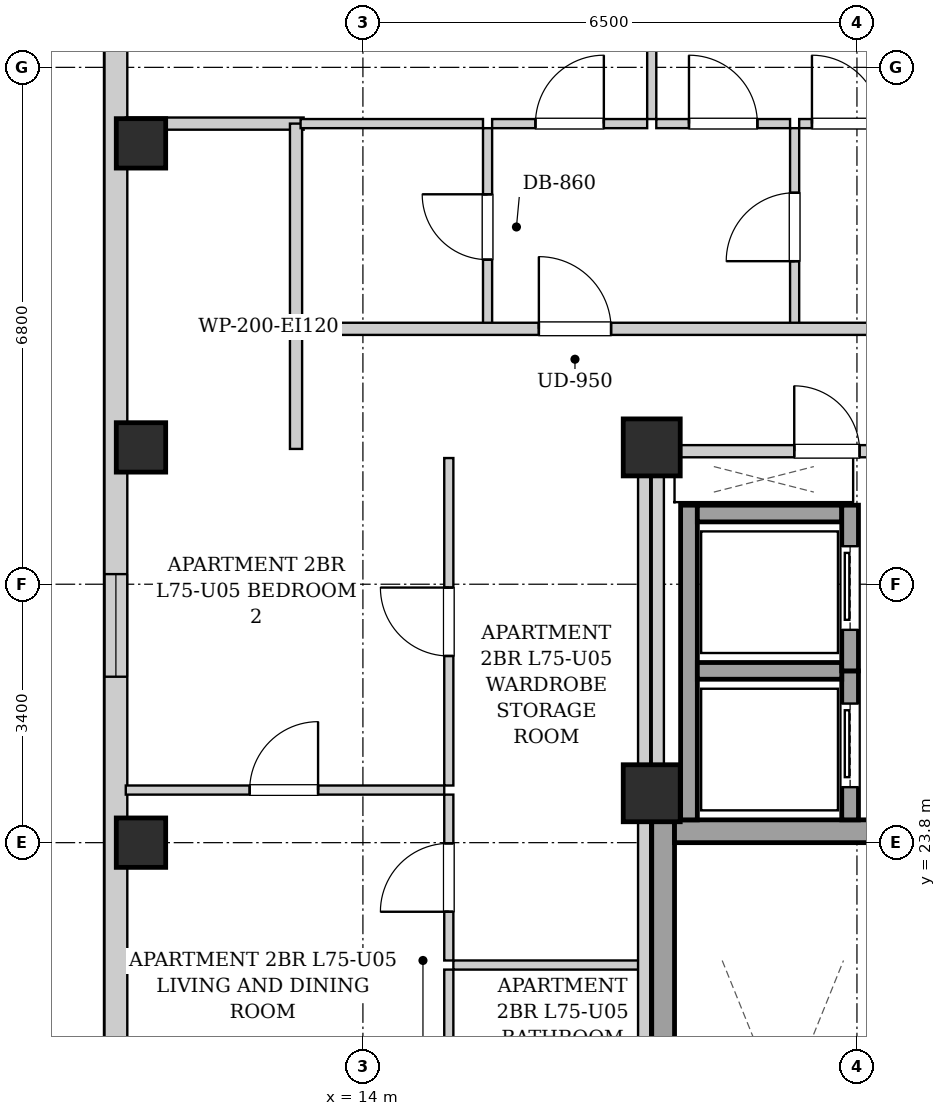
"""IFC4 building model, lengths in metres.
Left out: names, types, materials, properties, quantities, classifications, styles, units other than length and angle.
Written with IfcOpenShell. Run it as: python <this file> out.ifc"""

import sys

from ifc_helpers import new_model, si_unit, direction, frame, frame_2d, origin, origin_2d, place, context, subcontext, project, spatial, rectangle, extrude, element, fill, save


model = new_model("IFC4")
c1 = context("Model", 3, precision=1e-05, world=origin(), true_north=direction((0.0, 1.0)))
c2 = subcontext(c1, "Body", "Model", "MODEL_VIEW")
j1 = project(units=[si_unit("LENGTHUNIT", "METRE"), si_unit("PLANEANGLEUNIT", "RADIAN")], contexts=[c1])
p1 = place(None, origin())
s1 = spatial("IfcSite", under=j1, at=p1, CompositionType="ELEMENT")
p2 = place(p1, origin())
s2 = spatial("IfcBuilding", under=s1, at=p2, CompositionType="ELEMENT")
p3 = place(p2, frame((0.0, 0.0, 258.1)))
s3 = spatial("IfcBuildingStorey", under=s2, at=p3, CompositionType="ELEMENT", Elevation=258.1)
for number, where, z_axis, x_axis in (
    (1, (11.08, 23.8, 0.0), (0.0, 0.0, 1.0), (1.0, 0.0, 0.0)),
    (2, (11.08, 29.0, 0.0), (0.0, 0.0, 1.0), (1.0, 0.0, 0.0)),
    (3, (11.08, 33.0, 0.0), (0.0, 0.0, 1.0), (1.0, 0.0, 0.0)),
):
    element("IfcColumn", number, at=place(p3, frame(where, z_axis=z_axis, x_axis=x_axis)), inside=s3, PredefinedType="COLUMN", context=c2, shape_type="SweptSolid", body=[
        extrude(rectangle(XDim=0.65, YDim=0.65, at=origin_2d()), origin(), (0.0, 0.0, 1.0), 3.4),
    ])
for number, where, z_axis, x_axis in (
    (4, (17.8, 29.0, 0.0), (0.0, 0.0, 1.0), (1.0, 0.0, 0.0)),
    (5, (17.8, 24.45, 0.0), (0.0, 0.0, 1.0), (1.0, 0.0, 0.0)),
):
    element("IfcColumn", number, at=place(p3, frame(where, z_axis=z_axis, x_axis=x_axis)), inside=s3, PredefinedType="COLUMN", context=c2, shape_type="SweptSolid", body=[
        extrude(rectangle(XDim=0.75, YDim=0.75, at=origin_2d()), origin(), (0.0, 0.0, 1.0), 3.4),
    ])
p4 = place(p3, frame((10.75, 6.3, 0.0), z_axis=(0.0, 0.0, 1.0), x_axis=(0.0, 1.0, 0.0)))
e6 = element("IfcWall", 6, at=p4, inside=s3, PredefinedType="SOLIDWALL", context=c2, shape_type="SweptSolid", body=[
    extrude(rectangle(XDim=31.4, YDim=0.3, at=frame_2d((15.7, 0.0))), origin(), (0.0, 0.0, 1.0), 3.05),
])
p5 = place(p4, frame((1.653, 0.0, 0.55)))
e7 = element("IfcOpeningElement", 7, at=p5, cuts=e6, PredefinedType="OPENING", context=c2, shape_type="SweptSolid", body=[
    extrude(rectangle(XDim=1.35, YDim=1.2, at=frame_2d((0.675, 0.6))), frame((0.0, 0.16, 0.0), z_axis=(0.0, -1.0, 0.0), x_axis=(1.0, 0.0, 0.0)), (0.0, 0.0, 1.0), 0.32),
])
p6 = place(p4, frame((10.367, 0.0, 0.55)))
e8 = element("IfcOpeningElement", 8, at=p6, cuts=e6, PredefinedType="OPENING", context=c2, shape_type="SweptSolid", body=[
    extrude(rectangle(XDim=1.35, YDim=1.2, at=frame_2d((0.675, 0.6))), frame((0.0, 0.16, 0.0), z_axis=(0.0, -1.0, 0.0), x_axis=(1.0, 0.0, 0.0)), (0.0, 0.0, 1.0), 0.32),
])
p7 = place(p4, frame((19.683, 0.0, 0.55)))
e9 = element("IfcOpeningElement", 9, at=p7, cuts=e6, PredefinedType="OPENING", context=c2, shape_type="SweptSolid", body=[
    extrude(rectangle(XDim=1.35, YDim=1.2, at=frame_2d((0.675, 0.6))), frame((0.0, 0.16, 0.0), z_axis=(0.0, -1.0, 0.0), x_axis=(1.0, 0.0, 0.0)), (0.0, 0.0, 1.0), 0.32),
])
p8 = place(p3, frame((17.95, 15.1, 0.0), z_axis=(0.0, 0.0, 1.0), x_axis=(0.0, 1.0, 0.0)))
e10 = element("IfcWall", 10, at=p8, inside=s3, PredefinedType="SHEAR", context=c2, shape_type="SweptSolid", body=[
    extrude(rectangle(XDim=9.0, YDim=0.3, at=frame_2d((4.5, 0.0))), origin(), (0.0, 0.0, 1.0), 3.05),
])
p9 = place(p3, frame((18.1, 23.95, 0.0), z_axis=(0.0, 0.0, 1.0), x_axis=(1.0, 0.0, 0.0)))
e11 = element("IfcWall", 11, at=p9, inside=s3, PredefinedType="SHEAR", context=c2, shape_type="SweptSolid", body=[
    extrude(rectangle(XDim=2.85, YDim=0.3, at=frame_2d((1.425, 0.0))), origin(), (0.0, 0.0, 1.0), 3.05),
])
p10 = place(p3, frame((18.29, 24.1, 0.0), z_axis=(0.0, 0.0, 1.0), x_axis=(0.0, 1.0, 0.0)))
e12 = element("IfcWall", 12, at=p10, inside=s3, PredefinedType="SHEAR", context=c2, shape_type="SweptSolid", body=[
    extrude(rectangle(XDim=4.14, YDim=0.22, at=frame_2d((2.07, 0.0))), origin(), (0.0, 0.0, 1.0), 3.05),
])
p11 = place(p3, frame((20.41, 24.1, 0.0), z_axis=(0.0, 0.0, 1.0), x_axis=(0.0, 1.0, 0.0)))
e13 = element("IfcWall", 13, at=p11, inside=s3, PredefinedType="SHEAR", context=c2, shape_type="SweptSolid", body=[
    extrude(rectangle(XDim=1.96, YDim=0.22, at=frame_2d((0.98, 0.0))), origin(), (0.0, 0.0, 1.0), 3.05),
])
p12 = place(p11, frame((0.43, 0.0, 0.0)))
e14 = element("IfcOpeningElement", 14, at=p12, cuts=e13, PredefinedType="OPENING", context=c2, shape_type="SweptSolid", body=[
    extrude(rectangle(XDim=1.1, YDim=2.15, at=frame_2d((0.55, 1.075))), frame((0.0, 0.12, 0.0), z_axis=(0.0, -1.0, 0.0), x_axis=(1.0, 0.0, 0.0)), (0.0, 0.0, 1.0), 0.24),
])
for number, where, z_axis, x_axis in (
    (15, (18.4, 26.06, 0.0), (0.0, 0.0, 1.0), (1.0, 0.0, 0.0)),
    (16, (18.4, 28.13, 0.0), (0.0, 0.0, 1.0), (1.0, 0.0, 0.0)),
):
    element("IfcWall", number, at=place(p3, frame(where, z_axis=z_axis, x_axis=x_axis)), inside=s3, PredefinedType="SHEAR", context=c2, shape_type="SweptSolid", body=[
        extrude(rectangle(XDim=1.9, YDim=0.22, at=frame_2d((0.95, 0.0))), origin(), (0.0, 0.0, 1.0), 3.05),
    ])
p13 = place(p3, frame((20.41, 26.06, 0.0), z_axis=(0.0, 0.0, 1.0), x_axis=(0.0, 1.0, 0.0)))
e17 = element("IfcWall", 17, at=p13, inside=s3, PredefinedType="SHEAR", context=c2, shape_type="SweptSolid", body=[
    extrude(rectangle(XDim=2.18, YDim=0.22, at=frame_2d((1.09, 0.0))), origin(), (0.0, 0.0, 1.0), 3.05),
])
p14 = place(p13, frame((0.54, 0.0, 0.0)))
e18 = element("IfcOpeningElement", 18, at=p14, cuts=e17, PredefinedType="OPENING", context=c2, shape_type="SweptSolid", body=[
    extrude(rectangle(XDim=1.1, YDim=2.15, at=frame_2d((0.55, 1.075))), frame((0.0, 0.12, 0.0), z_axis=(0.0, -1.0, 0.0), x_axis=(1.0, 0.0, 0.0)), (0.0, 0.0, 1.0), 0.24),
])
p15 = place(p3, frame((17.88, 24.12, 0.0), z_axis=(0.0, 0.0, 1.0), x_axis=(0.0, 1.0, 0.0)))
e19 = element("IfcWall", 19, at=p15, inside=s3, PredefinedType="PARTITIONING", context=c2, shape_type="SweptSolid", body=[
    extrude(rectangle(XDim=4.76, YDim=0.16, at=frame_2d((2.38, 0.0))), origin(), (0.0, 0.0, 1.0), 2.385),
])
p16 = place(p3, frame((17.96, 28.95, 0.0), z_axis=(0.0, 0.0, 1.0), x_axis=(1.0, 0.0, 0.0)))
e20 = element("IfcWall", 20, at=p16, inside=s3, PredefinedType="PARTITIONING", context=c2, shape_type="SweptSolid", body=[
    extrude(rectangle(XDim=4.29, YDim=0.16, at=frame_2d((2.145, 0.0))), origin(), (0.0, 0.0, 1.0), 2.578),
])
p17 = place(p16, frame((1.715, 0.0, 0.0)))
e21 = element("IfcOpeningElement", 21, at=p17, cuts=e20, PredefinedType="OPENING", context=c2, shape_type="SweptSolid", body=[
    extrude(rectangle(XDim=0.86, YDim=2.05, at=frame_2d((0.43, 1.025))), frame((0.0, 0.09, 0.0), z_axis=(0.0, -1.0, 0.0), x_axis=(1.0, 0.0, 0.0)), (0.0, 0.0, 1.0), 0.18),
])
p18 = place(p3, frame((13.12, 28.98, 0.0), z_axis=(0.0, 0.0, 1.0), x_axis=(0.0, 1.0, 0.0)))
e22 = element("IfcWall", 22, at=p18, inside=s3, PredefinedType="PARTITIONING", context=c2, shape_type="SweptSolid", body=[
    extrude(rectangle(XDim=1.58, YDim=0.16, at=frame_2d((0.79, 0.0))), origin(), (0.0, 0.0, 1.0), 3.05),
])
p19 = place(p3, frame((10.88, 33.26, 0.0), z_axis=(0.0, 0.0, 1.0), x_axis=(1.0, 0.0, 0.0)))
e23 = element("IfcWall", 23, at=p19, inside=s3, PredefinedType="PARTITIONING", context=c2, shape_type="SweptSolid", body=[
    extrude(rectangle(XDim=2.34, YDim=0.16, at=frame_2d((1.17, 0.0))), origin(), (0.0, 0.0, 1.0), 3.05),
])
p20 = place(p3, frame((13.12, 30.6, 0.0), z_axis=(0.0, 0.0, 1.0), x_axis=(0.0, 1.0, 0.0)))
e24 = element("IfcWall", 24, at=p20, inside=s3, PredefinedType="PARTITIONING", context=c2, shape_type="SweptSolid", body=[
    extrude(rectangle(XDim=2.66, YDim=0.16, at=frame_2d((1.33, 0.0))), origin(), (0.0, 0.0, 1.0), 3.05),
])
p21 = place(p3, frame((15.64, 30.6, 0.0), z_axis=(0.0, 0.0, 1.0), x_axis=(0.0, 1.0, 0.0)))
e25 = element("IfcWall", 25, at=p21, inside=s3, PredefinedType="PARTITIONING", context=c2, shape_type="SweptSolid", body=[
    extrude(rectangle(XDim=2.6, YDim=0.12, at=frame_2d((1.3, 0.0))), origin(), (0.0, 0.0, 1.0), 3.05),
])
p22 = place(p21, frame((0.87, 0.0, 0.0)))
e26 = element("IfcOpeningElement", 26, at=p22, cuts=e25, PredefinedType="OPENING", context=c2, shape_type="SweptSolid", body=[
    extrude(rectangle(XDim=0.86, YDim=2.05, at=frame_2d((0.43, 1.025))), frame((0.0, 0.07, 0.0), z_axis=(0.0, -1.0, 0.0), x_axis=(1.0, 0.0, 0.0)), (0.0, 0.0, 1.0), 0.14),
])
p23 = place(p3, frame((13.18, 33.26, 0.0), z_axis=(0.0, 0.0, 1.0), x_axis=(1.0, 0.0, 0.0)))
e27 = element("IfcWall", 27, at=p23, inside=s3, PredefinedType="PARTITIONING", context=c2, shape_type="SweptSolid", body=[
    extrude(rectangle(XDim=2.4, YDim=0.12, at=frame_2d((1.2, 0.0))), origin(), (0.0, 0.0, 1.0), 3.05),
])
p24 = place(p3, frame((19.68, 30.6, 0.0), z_axis=(0.0, 0.0, 1.0), x_axis=(0.0, 1.0, 0.0)))
e28 = element("IfcWall", 28, at=p24, inside=s3, PredefinedType="PARTITIONING", context=c2, shape_type="SweptSolid", body=[
    extrude(rectangle(XDim=2.6, YDim=0.12, at=frame_2d((1.3, 0.0))), origin(), (0.0, 0.0, 1.0), 3.05),
])
p25 = place(p24, frame((0.85, 0.0, 0.0)))
e29 = element("IfcOpeningElement", 29, at=p25, cuts=e28, PredefinedType="OPENING", context=c2, shape_type="SweptSolid", body=[
    extrude(rectangle(XDim=0.9, YDim=2.05, at=frame_2d((0.45, 1.025))), frame((0.0, 0.07, 0.0), z_axis=(0.0, -1.0, 0.0), x_axis=(1.0, 0.0, 0.0)), (0.0, 0.0, 1.0), 0.14),
])
p26 = place(p3, frame((15.7, 33.26, 0.0), z_axis=(0.0, 0.0, 1.0), x_axis=(1.0, 0.0, 0.0)))
e30 = element("IfcWall", 30, at=p26, inside=s3, PredefinedType="PARTITIONING", context=c2, shape_type="SweptSolid", body=[
    extrude(rectangle(XDim=2.04, YDim=0.12, at=frame_2d((1.02, 0.0))), origin(), (0.0, 0.0, 1.0), 3.05),
])
p27 = place(p26, frame((0.57, 0.0, 0.0)))
e31 = element("IfcOpeningElement", 31, at=p27, cuts=e30, PredefinedType="OPENING", context=c2, shape_type="SweptSolid", body=[
    extrude(rectangle(XDim=0.9, YDim=2.05, at=frame_2d((0.45, 1.025))), frame((0.0, 0.07, 0.0), z_axis=(0.0, -1.0, 0.0), x_axis=(1.0, 0.0, 0.0)), (0.0, 0.0, 1.0), 0.14),
])
p28 = place(p3, frame((17.86, 33.26, 0.0), z_axis=(0.0, 0.0, 1.0), x_axis=(1.0, 0.0, 0.0)))
e32 = element("IfcWall", 32, at=p28, inside=s3, PredefinedType="PARTITIONING", context=c2, shape_type="SweptSolid", body=[
    extrude(rectangle(XDim=1.76, YDim=0.12, at=frame_2d((0.88, 0.0))), origin(), (0.0, 0.0, 1.0), 3.05),
])
p29 = place(p28, frame((0.43, 0.0, 0.0)))
e33 = element("IfcOpeningElement", 33, at=p29, cuts=e32, PredefinedType="OPENING", context=c2, shape_type="SweptSolid", body=[
    extrude(rectangle(XDim=0.9, YDim=2.05, at=frame_2d((0.45, 1.025))), frame((0.0, 0.07, 0.0), z_axis=(0.0, -1.0, 0.0), x_axis=(1.0, 0.0, 0.0)), (0.0, 0.0, 1.0), 0.14),
])
p30 = place(p3, frame((19.74, 33.26, 0.0), z_axis=(0.0, 0.0, 1.0), x_axis=(1.0, 0.0, 0.0)))
e34 = element("IfcWall", 34, at=p30, inside=s3, PredefinedType="PARTITIONING", context=c2, shape_type="SweptSolid", body=[
    extrude(rectangle(XDim=1.237, YDim=0.12, at=frame_2d((0.619, 0.0))), origin(), (0.0, 0.0, 1.0), 3.05),
])
p31 = place(p30, frame((0.168, 0.0, 0.0)))
e35 = element("IfcOpeningElement", 35, at=p31, cuts=e34, PredefinedType="OPENING", context=c2, shape_type="SweptSolid", body=[
    extrude(rectangle(XDim=0.9, YDim=2.05, at=frame_2d((0.45, 1.025))), frame((0.0, 0.07, 0.0), z_axis=(0.0, -1.0, 0.0), x_axis=(1.0, 0.0, 0.0)), (0.0, 0.0, 1.0), 0.14),
])
p32 = place(p3, frame((17.8, 33.32, 0.0), z_axis=(0.0, 0.0, 1.0), x_axis=(0.0, 1.0, 0.0)))
e36 = element("IfcWall", 36, at=p32, inside=s3, PredefinedType="PARTITIONING", context=c2, shape_type="SweptSolid", body=[
    extrude(rectangle(XDim=6.6, YDim=0.12, at=frame_2d((3.3, 0.0))), origin(), (0.0, 0.0, 1.0), 2.578),
])
p33 = place(p32, frame((2.835, 0.0, 0.0)))
e37 = element("IfcOpeningElement", 37, at=p33, cuts=e36, PredefinedType="OPENING", context=c2, shape_type="SweptSolid", body=[
    extrude(rectangle(XDim=0.9, YDim=2.05, at=frame_2d((0.45, 1.025))), frame((0.0, 0.07, 0.0), z_axis=(0.0, -1.0, 0.0), x_axis=(1.0, 0.0, 0.0)), (0.0, 0.0, 1.0), 0.14),
])
p34 = place(p3, frame((15.19, 22.19, 0.0), z_axis=(0.0, 0.0, 1.0), x_axis=(1.0, 0.0, 0.0)))
e38 = element("IfcWall", 38, at=p34, inside=s3, PredefinedType="PARTITIONING", context=c2, shape_type="SweptSolid", body=[
    extrude(rectangle(XDim=2.45, YDim=0.12, at=frame_2d((1.225, 0.0))), origin(), (0.0, 0.0, 1.0), 3.05),
])
p35 = place(p3, frame((15.13, 22.25, 0.0), z_axis=(0.0, 0.0, 1.0), x_axis=(0.0, 1.0, 0.0)))
e39 = element("IfcWall", 39, at=p35, inside=s3, PredefinedType="PARTITIONING", context=c2, shape_type="SweptSolid", body=[
    extrude(rectangle(XDim=2.182, YDim=0.12, at=frame_2d((1.091, 0.0))), origin(), (0.0, 0.0, 1.0), 3.05),
])
p36 = place(p35, frame((0.641, 0.0, 0.0)))
e40 = element("IfcOpeningElement", 40, at=p36, cuts=e39, PredefinedType="OPENING", context=c2, shape_type="SweptSolid", body=[
    extrude(rectangle(XDim=0.9, YDim=2.05, at=frame_2d((0.45, 1.025))), frame((0.0, 0.07, 0.0), z_axis=(0.0, -1.0, 0.0), x_axis=(1.0, 0.0, 0.0)), (0.0, 0.0, 1.0), 0.14),
])
p37 = place(p3, frame((15.13, 24.552, 0.0), z_axis=(0.0, 0.0, 1.0), x_axis=(0.0, 1.0, 0.0)))
e41 = element("IfcWall", 41, at=p37, inside=s3, PredefinedType="PARTITIONING", context=c2, shape_type="SweptSolid", body=[
    extrude(rectangle(XDim=4.308, YDim=0.12, at=frame_2d((2.154, 0.0))), origin(), (0.0, 0.0, 1.0), 3.05),
])
p38 = place(p37, frame((1.704, 0.0, 0.0)))
e42 = element("IfcOpeningElement", 42, at=p38, cuts=e41, PredefinedType="OPENING", context=c2, shape_type="SweptSolid", body=[
    extrude(rectangle(XDim=0.9, YDim=2.05, at=frame_2d((0.45, 1.025))), frame((0.0, 0.07, 0.0), z_axis=(0.0, -1.0, 0.0), x_axis=(1.0, 0.0, 0.0)), (0.0, 0.0, 1.0), 0.14),
])
p39 = place(p3, frame((15.13, 19.83, 0.0), z_axis=(0.0, 0.0, 1.0), x_axis=(0.0, 1.0, 0.0)))
e43 = element("IfcWall", 43, at=p39, inside=s3, PredefinedType="PARTITIONING", context=c2, shape_type="SweptSolid", body=[
    extrude(rectangle(XDim=2.3, YDim=0.12, at=frame_2d((1.15, 0.0))), origin(), (0.0, 0.0, 1.0), 3.05),
])
p40 = place(p3, frame((10.88, 24.492, 0.0), z_axis=(0.0, 0.0, 1.0), x_axis=(1.0, 0.0, 0.0)))
e44 = element("IfcWall", 44, at=p40, inside=s3, PredefinedType="PARTITIONING", context=c2, shape_type="SweptSolid", body=[
    extrude(rectangle(XDim=4.19, YDim=0.12, at=frame_2d((2.095, 0.0))), origin(), (0.0, 0.0, 1.0), 2.788),
])
p41 = place(p40, frame((1.63, 0.0, 0.0)))
e45 = element("IfcOpeningElement", 45, at=p41, cuts=e44, PredefinedType="OPENING", context=c2, shape_type="SweptSolid", body=[
    extrude(rectangle(XDim=0.9, YDim=2.05, at=frame_2d((0.45, 1.025))), frame((0.0, 0.07, 0.0), z_axis=(0.0, -1.0, 0.0), x_axis=(1.0, 0.0, 0.0)), (0.0, 0.0, 1.0), 0.14),
])
p42 = place(p3, frame((13.15, 30.56, 0.0), z_axis=(0.0, 0.0, 1.0), x_axis=(1.0, 0.0, 0.0)))
e46 = element("IfcWall", 46, at=p42, inside=s3, PredefinedType="PARTITIONING", context=c2, shape_type="SweptSolid", body=[
    extrude(rectangle(XDim=24.6, YDim=0.16, at=frame_2d((12.3, 0.0))), origin(), (0.0, 0.0, 1.0), 3.05),
])
p43 = place(p42, frame((3.165, 0.0, 0.0)))
e47 = element("IfcOpeningElement", 47, at=p43, cuts=e46, PredefinedType="OPENING", context=c2, shape_type="SweptSolid", body=[
    extrude(rectangle(XDim=0.95, YDim=2.1, at=frame_2d((0.475, 1.05))), frame((0.0, 0.09, 0.0), z_axis=(0.0, -1.0, 0.0), x_axis=(1.0, 0.0, 0.0)), (0.0, 0.0, 1.0), 0.18),
])
p44 = place(p42, frame((21.55, 0.0, 0.0)))
e48 = element("IfcOpeningElement", 48, at=p44, cuts=e46, PredefinedType="OPENING", context=c2, shape_type="SweptSolid", body=[
    extrude(rectangle(XDim=0.95, YDim=2.1, at=frame_2d((0.475, 1.05))), frame((0.0, 0.09, 0.0), z_axis=(0.0, -1.0, 0.0), x_axis=(1.0, 0.0, 0.0)), (0.0, 0.0, 1.0), 0.18),
])
p45 = place(p3, frame((17.7, 15.02, 0.0), z_axis=(0.0, 0.0, 1.0), x_axis=(0.0, 1.0, 0.0)))
e49 = element("IfcWall", 49, at=p45, inside=s3, PredefinedType="PARTITIONING", context=c2, shape_type="SweptSolid", body=[
    extrude(rectangle(XDim=13.98, YDim=0.16, at=frame_2d((6.99, 0.0))), origin(), (0.0, 0.0, 1.0), 2.385),
])
p46 = place(p12, origin())
e50 = element("IfcDoor", 50, at=p46, inside=s3, OperationType="SLIDING_TO_LEFT", PredefinedType="DOOR", context=c2, shape_type="SweptSolid", body=[
    extrude(rectangle(XDim=1.1, YDim=2.15, at=frame_2d((0.55, 1.075))), frame((0.0, 0.025, 0.0), z_axis=(0.0, -1.0, 0.0), x_axis=(1.0, 0.0, 0.0)), (0.0, 0.0, 1.0), 0.05),
])
fill(e14, e50)
p47 = place(p14, origin())
e51 = element("IfcDoor", 51, at=p47, inside=s3, OperationType="SLIDING_TO_LEFT", PredefinedType="DOOR", context=c2, shape_type="SweptSolid", body=[
    extrude(rectangle(XDim=1.1, YDim=2.15, at=frame_2d((0.55, 1.075))), frame((0.0, 0.025, 0.0), z_axis=(0.0, -1.0, 0.0), x_axis=(1.0, 0.0, 0.0)), (0.0, 0.0, 1.0), 0.05),
])
fill(e18, e51)
p48 = place(p17, origin())
e52 = element("IfcDoor", 52, at=p48, inside=s3, OperationType="SINGLE_SWING_LEFT", PredefinedType="DOOR", context=c2, shape_type="SweptSolid", body=[
    extrude(rectangle(XDim=0.86, YDim=2.05, at=frame_2d((0.43, 1.025))), frame((0.0, 0.025, 0.0), z_axis=(0.0, -1.0, 0.0), x_axis=(1.0, 0.0, 0.0)), (0.0, 0.0, 1.0), 0.05),
])
fill(e21, e52)
p49 = place(p22, origin())
e53 = element("IfcDoor", 53, at=p49, inside=s3, OperationType="SINGLE_SWING_RIGHT", PredefinedType="DOOR", context=c2, shape_type="SweptSolid", body=[
    extrude(rectangle(XDim=0.86, YDim=2.05, at=frame_2d((0.43, 1.025))), frame((0.0, 0.025, 0.0), z_axis=(0.0, -1.0, 0.0), x_axis=(1.0, 0.0, 0.0)), (0.0, 0.0, 1.0), 0.05),
])
fill(e26, e53)
p50 = place(p25, origin())
e54 = element("IfcDoor", 54, at=p50, inside=s3, OperationType="SINGLE_SWING_LEFT", PredefinedType="DOOR", context=c2, shape_type="SweptSolid", body=[
    extrude(rectangle(XDim=0.9, YDim=2.05, at=frame_2d((0.45, 1.025))), frame((0.0, 0.025, 0.0), z_axis=(0.0, -1.0, 0.0), x_axis=(1.0, 0.0, 0.0)), (0.0, 0.0, 1.0), 0.05),
])
fill(e29, e54)
p51 = place(p27, origin())
e55 = element("IfcDoor", 55, at=p51, inside=s3, OperationType="SINGLE_SWING_RIGHT", PredefinedType="DOOR", context=c2, shape_type="SweptSolid", body=[
    extrude(rectangle(XDim=0.9, YDim=2.05, at=frame_2d((0.45, 1.025))), frame((0.0, 0.025, 0.0), z_axis=(0.0, -1.0, 0.0), x_axis=(1.0, 0.0, 0.0)), (0.0, 0.0, 1.0), 0.05),
])
fill(e31, e55)
p52 = place(p29, origin())
e56 = element("IfcDoor", 56, at=p52, inside=s3, OperationType="SINGLE_SWING_LEFT", PredefinedType="DOOR", context=c2, shape_type="SweptSolid", body=[
    extrude(rectangle(XDim=0.9, YDim=2.05, at=frame_2d((0.45, 1.025))), frame((0.0, 0.025, 0.0), z_axis=(0.0, -1.0, 0.0), x_axis=(1.0, 0.0, 0.0)), (0.0, 0.0, 1.0), 0.05),
])
fill(e33, e56)
p53 = place(p31, origin())
e57 = element("IfcDoor", 57, at=p53, inside=s3, OperationType="SINGLE_SWING_LEFT", PredefinedType="DOOR", context=c2, shape_type="SweptSolid", body=[
    extrude(rectangle(XDim=0.9, YDim=2.05, at=frame_2d((0.45, 1.025))), frame((0.0, 0.025, 0.0), z_axis=(0.0, -1.0, 0.0), x_axis=(1.0, 0.0, 0.0)), (0.0, 0.0, 1.0), 0.05),
])
fill(e35, e57)
p54 = place(p36, origin())
e58 = element("IfcDoor", 58, at=p54, inside=s3, OperationType="SINGLE_SWING_LEFT", PredefinedType="DOOR", context=c2, shape_type="SweptSolid", body=[
    extrude(rectangle(XDim=0.9, YDim=2.05, at=frame_2d((0.45, 1.025))), frame((0.0, 0.025, 0.0), z_axis=(0.0, -1.0, 0.0), x_axis=(1.0, 0.0, 0.0)), (0.0, 0.0, 1.0), 0.05),
])
fill(e40, e58)
p55 = place(p38, origin())
e59 = element("IfcDoor", 59, at=p55, inside=s3, OperationType="SINGLE_SWING_RIGHT", PredefinedType="DOOR", context=c2, shape_type="SweptSolid", body=[
    extrude(rectangle(XDim=0.9, YDim=2.05, at=frame_2d((0.45, 1.025))), frame((0.0, 0.025, 0.0), z_axis=(0.0, -1.0, 0.0), x_axis=(1.0, 0.0, 0.0)), (0.0, 0.0, 1.0), 0.05),
])
fill(e42, e59)
p56 = place(p41, origin())
e60 = element("IfcDoor", 60, at=p56, inside=s3, OperationType="SINGLE_SWING_RIGHT", PredefinedType="DOOR", context=c2, shape_type="SweptSolid", body=[
    extrude(rectangle(XDim=0.9, YDim=2.05, at=frame_2d((0.45, 1.025))), frame((0.0, 0.025, 0.0), z_axis=(0.0, -1.0, 0.0), x_axis=(1.0, 0.0, 0.0)), (0.0, 0.0, 1.0), 0.05),
])
fill(e45, e60)
p57 = place(p43, origin())
e61 = element("IfcDoor", 61, at=p57, inside=s3, OperationType="SINGLE_SWING_LEFT", PredefinedType="DOOR", context=c2, shape_type="SweptSolid", body=[
    extrude(rectangle(XDim=0.95, YDim=2.1, at=frame_2d((0.475, 1.05))), frame((0.0, 0.025, 0.0), z_axis=(0.0, -1.0, 0.0), x_axis=(1.0, 0.0, 0.0)), (0.0, 0.0, 1.0), 0.05),
])
fill(e47, e61)
p58 = place(p7, origin())
e62 = element("IfcWindow", 62, at=p58, inside=s3, PartitioningType="SINGLE_PANEL", PredefinedType="WINDOW", context=c2, shape_type="SweptSolid", body=[
    extrude(rectangle(XDim=1.35, YDim=1.2, at=frame_2d((0.675, 0.6))), frame((0.0, 0.03, 0.0), z_axis=(0.0, -1.0, 0.0), x_axis=(1.0, 0.0, 0.0)), (0.0, 0.0, 1.0), 0.06),
])
fill(e9, e62)
save(model, sys.argv[1])
